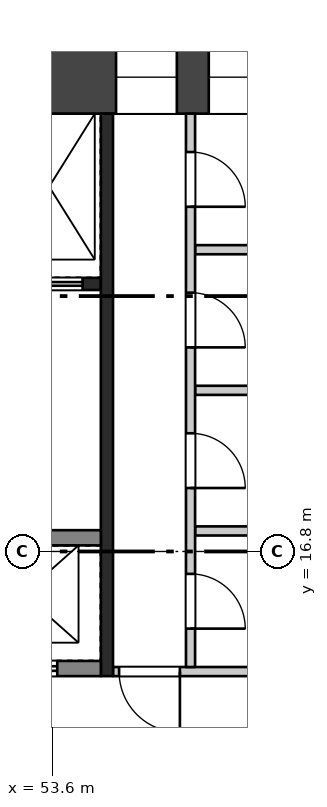
"""IFC4 building model, lengths in metres.
Left out: names, types, materials, properties, quantities, classifications, styles, units other than length and angle.
Written with IfcOpenShell. Run it as: python <this file> out.ifc"""

import sys

from ifc_helpers import new_model, si_unit, direction, frame, frame_2d, origin, place, context, subcontext, project, spatial, rectangle, extrude, element, fill, save


model = new_model("IFC4")
c1 = context("Model", 3, precision=1e-05, world=origin(), true_north=direction((0.0, 1.0)))
c2 = subcontext(c1, "Body", "Model", "MODEL_VIEW")
j1 = project(units=[si_unit("LENGTHUNIT", "METRE"), si_unit("PLANEANGLEUNIT", "RADIAN")], contexts=[c1])
p1 = place(None, origin())
s1 = spatial("IfcSite", under=j1, at=p1, CompositionType="ELEMENT")
p2 = place(p1, origin())
s2 = spatial("IfcBuilding", under=s1, at=p2, CompositionType="ELEMENT")
p3 = place(p2, frame((0.0, 0.0, 158.2)))
s3 = spatial("IfcBuildingStorey", under=s2, at=p3, CompositionType="ELEMENT", Elevation=158.2)
p4 = place(p3, frame((42.0, 24.6, 0.0), z_axis=(0.0, 0.0, 1.0), x_axis=(1.0, 0.0, 0.0)))
e1 = element("IfcWall", 1, at=p4, inside=s3, PredefinedType="SHEAR", context=c2, shape_type="SweptSolid", body=[
    extrude(rectangle(XDim=16.8, YDim=1.2, at=frame_2d((8.4, 0.0))), origin(), (0.0, 0.0, 1.0), 3.22),
])
p5 = place(p4, frame((1.8, 0.0, 0.5)))
e2 = element("IfcOpeningElement", 2, at=p5, cuts=e1, PredefinedType="OPENING", context=c2, shape_type="SweptSolid", body=[
    extrude(rectangle(XDim=1.8, YDim=2.4, at=frame_2d((0.9, 1.2))), frame((0.0, 0.61, 0.0), z_axis=(0.0, -1.0, 0.0), x_axis=(1.0, 0.0, 0.0)), (0.0, 0.0, 1.0), 1.22),
])
p6 = place(p4, frame((4.49, 0.0, 1.6)))
e3 = element("IfcOpeningElement", 3, at=p6, cuts=e1, PredefinedType="OPENING", context=c2, shape_type="SweptSolid", body=[
    extrude(rectangle(XDim=0.9, YDim=1.2, at=frame_2d((0.45, 0.6))), frame((0.0, 0.61, 0.0), z_axis=(0.0, -1.0, 0.0), x_axis=(1.0, 0.0, 0.0)), (0.0, 0.0, 1.0), 1.22),
])
p7 = place(p4, frame((5.71, 0.0, 1.6)))
e4 = element("IfcOpeningElement", 4, at=p7, cuts=e1, PredefinedType="OPENING", context=c2, shape_type="SweptSolid", body=[
    extrude(rectangle(XDim=1.1, YDim=1.2, at=frame_2d((0.55, 0.6))), frame((0.0, 0.61, 0.0), z_axis=(0.0, -1.0, 0.0), x_axis=(1.0, 0.0, 0.0)), (0.0, 0.0, 1.0), 1.22),
])
p8 = place(p4, frame((7.15, 0.0, 1.6)))
e5 = element("IfcOpeningElement", 5, at=p8, cuts=e1, PredefinedType="OPENING", context=c2, shape_type="SweptSolid", body=[
    extrude(rectangle(XDim=1.1, YDim=1.2, at=frame_2d((0.55, 0.6))), frame((0.0, 0.61, 0.0), z_axis=(0.0, -1.0, 0.0), x_axis=(1.0, 0.0, 0.0)), (0.0, 0.0, 1.0), 1.22),
])
p9 = place(p4, frame((12.65, 0.0, 0.6)))
e6 = element("IfcOpeningElement", 6, at=p9, cuts=e1, PredefinedType="OPENING", context=c2, shape_type="SweptSolid", body=[
    extrude(rectangle(XDim=1.0, YDim=2.1, at=frame_2d((0.5, 1.05))), frame((0.0, 0.61, 0.0), z_axis=(0.0, -1.0, 0.0), x_axis=(1.0, 0.0, 0.0)), (0.0, 0.0, 1.0), 1.22),
])
p10 = place(p4, frame((14.175, 0.0, 1.6)))
e7 = element("IfcOpeningElement", 7, at=p10, cuts=e1, PredefinedType="OPENING", context=c2, shape_type="SweptSolid", body=[
    extrude(rectangle(XDim=1.2, YDim=1.2, at=frame_2d((0.6, 0.6))), frame((0.0, 0.61, 0.0), z_axis=(0.0, -1.0, 0.0), x_axis=(1.0, 0.0, 0.0)), (0.0, 0.0, 1.0), 1.22),
])
p11 = place(p3, frame((46.4, 14.875, 0.0), z_axis=(0.0, 0.0, 1.0), x_axis=(1.0, 0.0, 0.0)))
e8 = element("IfcWall", 8, at=p11, inside=s3, PredefinedType="SHEAR", context=c2, shape_type="SweptSolid", body=[
    extrude(rectangle(XDim=8.0, YDim=0.25, at=frame_2d((4.0, 0.0))), origin(), (0.0, 0.0, 1.0), 3.22),
])
p12 = place(p11, frame((0.717, 0.0, 0.0)))
e9 = element("IfcOpeningElement", 9, at=p12, cuts=e8, PredefinedType="OPENING", context=c2, shape_type="SweptSolid", body=[
    extrude(rectangle(XDim=1.1, YDim=2.1, at=frame_2d((0.55, 1.05))), frame((0.0, 0.135, 0.0), z_axis=(0.0, -1.0, 0.0), x_axis=(1.0, 0.0, 0.0)), (0.0, 0.0, 1.0), 0.27),
])
p13 = place(p11, frame((3.45, 0.0, 0.0)))
e10 = element("IfcOpeningElement", 10, at=p13, cuts=e8, PredefinedType="OPENING", context=c2, shape_type="SweptSolid", body=[
    extrude(rectangle(XDim=1.1, YDim=2.1, at=frame_2d((0.55, 1.05))), frame((0.0, 0.135, 0.0), z_axis=(0.0, -1.0, 0.0), x_axis=(1.0, 0.0, 0.0)), (0.0, 0.0, 1.0), 0.27),
])
p14 = place(p11, frame((6.183, 0.0, 0.0)))
e11 = element("IfcOpeningElement", 11, at=p14, cuts=e8, PredefinedType="OPENING", context=c2, shape_type="SweptSolid", body=[
    extrude(rectangle(XDim=1.1, YDim=2.1, at=frame_2d((0.55, 1.05))), frame((0.0, 0.135, 0.0), z_axis=(0.0, -1.0, 0.0), x_axis=(1.0, 0.0, 0.0)), (0.0, 0.0, 1.0), 0.27),
])
p15 = place(p3, frame((46.4, 17.025, 0.0), z_axis=(0.0, 0.0, 1.0), x_axis=(1.0, 0.0, 0.0)))
e12 = element("IfcWall", 12, at=p15, inside=s3, PredefinedType="SHEAR", context=c2, shape_type="SweptSolid", body=[
    extrude(rectangle(XDim=8.0, YDim=0.25, at=frame_2d((4.0, 0.0))), origin(), (0.0, 0.0, 1.0), 3.22),
])
p16 = place(p3, frame((46.4, 21.2, 0.0), z_axis=(0.0, 0.0, 1.0), x_axis=(1.0, 0.0, 0.0)))
e13 = element("IfcWall", 13, at=p16, inside=s3, PredefinedType="SHEAR", context=c2, shape_type="SweptSolid", body=[
    extrude(rectangle(XDim=8.0, YDim=0.2, at=frame_2d((4.0, 0.0))), origin(), (0.0, 0.0, 1.0), 3.22),
])
p17 = place(p16, frame((0.09, 0.0, 0.0)))
e14 = element("IfcOpeningElement", 14, at=p17, cuts=e13, PredefinedType="OPENING", context=c2, shape_type="SweptSolid", body=[
    extrude(rectangle(XDim=0.9, YDim=2.1, at=frame_2d((0.45, 1.05))), frame((0.0, 0.11, 0.0), z_axis=(0.0, -1.0, 0.0), x_axis=(1.0, 0.0, 0.0)), (0.0, 0.0, 1.0), 0.22),
])
p18 = place(p16, frame((1.41, 0.0, 0.0)))
e15 = element("IfcOpeningElement", 15, at=p18, cuts=e13, PredefinedType="OPENING", context=c2, shape_type="SweptSolid", body=[
    extrude(rectangle(XDim=0.9, YDim=2.1, at=frame_2d((0.45, 1.05))), frame((0.0, 0.11, 0.0), z_axis=(0.0, -1.0, 0.0), x_axis=(1.0, 0.0, 0.0)), (0.0, 0.0, 1.0), 0.22),
])
p19 = place(p16, frame((2.82, 0.0, 0.0)))
e16 = element("IfcOpeningElement", 16, at=p19, cuts=e13, PredefinedType="OPENING", context=c2, shape_type="SweptSolid", body=[
    extrude(rectangle(XDim=0.9, YDim=2.1, at=frame_2d((0.45, 1.05))), frame((0.0, 0.11, 0.0), z_axis=(0.0, -1.0, 0.0), x_axis=(1.0, 0.0, 0.0)), (0.0, 0.0, 1.0), 0.22),
])
p20 = place(p16, frame((4.55, 0.0, 0.0)))
e17 = element("IfcOpeningElement", 17, at=p20, cuts=e13, PredefinedType="OPENING", context=c2, shape_type="SweptSolid", body=[
    extrude(rectangle(XDim=1.1, YDim=2.1, at=frame_2d((0.55, 1.05))), frame((0.0, 0.11, 0.0), z_axis=(0.0, -1.0, 0.0), x_axis=(1.0, 0.0, 0.0)), (0.0, 0.0, 1.0), 0.22),
])
p21 = place(p16, frame((6.6, 0.0, 0.0)))
e18 = element("IfcOpeningElement", 18, at=p21, cuts=e13, PredefinedType="OPENING", context=c2, shape_type="SweptSolid", body=[
    extrude(rectangle(XDim=1.1, YDim=2.1, at=frame_2d((0.55, 1.05))), frame((0.0, 0.11, 0.0), z_axis=(0.0, -1.0, 0.0), x_axis=(1.0, 0.0, 0.0)), (0.0, 0.0, 1.0), 0.22),
])
p22 = place(p3, frame((54.5, 14.75, 0.0), z_axis=(0.0, 0.0, 1.0), x_axis=(0.0, 1.0, 0.0)))
e19 = element("IfcWall", 19, at=p22, inside=s3, PredefinedType="SHEAR", context=c2, shape_type="SweptSolid", body=[
    extrude(rectangle(XDim=9.25, YDim=0.2, at=frame_2d((4.625, 0.0))), origin(), (0.0, 0.0, 1.0), 3.22),
])
p23 = place(p3, frame((54.6, 14.825, 0.0), z_axis=(0.0, 0.0, 1.0), x_axis=(1.0, 0.0, 0.0)))
e20 = element("IfcWall", 20, at=p23, inside=s3, PredefinedType="PARTITIONING", context=c2, shape_type="SweptSolid", body=[
    extrude(rectangle(XDim=3.0, YDim=0.15, at=frame_2d((1.5, 0.0))), origin(), (0.0, 0.0, 1.0), 3.22),
])
p24 = place(p23, frame((0.1, 0.0, 0.0)))
e21 = element("IfcOpeningElement", 21, at=p24, cuts=e20, PredefinedType="OPENING", context=c2, shape_type="SweptSolid", body=[
    extrude(rectangle(XDim=1.0, YDim=2.1, at=frame_2d((0.5, 1.05))), frame((0.0, 0.085, 0.0), z_axis=(0.0, -1.0, 0.0), x_axis=(1.0, 0.0, 0.0)), (0.0, 0.0, 1.0), 0.17),
])
for number, where, z_axis, x_axis in (
    (22, (55.95, 17.137, 0.0), (0.0, 0.0, 1.0), (1.0, 0.0, 0.0)),
    (23, (55.95, 19.45, 0.0), (0.0, 0.0, 1.0), (1.0, 0.0, 0.0)),
    (24, (55.95, 21.762, 0.0), (0.0, 0.0, 1.0), (1.0, 0.0, 0.0)),
):
    element("IfcWall", number, at=place(p3, frame(where, z_axis=z_axis, x_axis=x_axis)), inside=s3, PredefinedType="PARTITIONING", context=c2, shape_type="SweptSolid", body=[
        extrude(rectangle(XDim=1.65, YDim=0.15, at=frame_2d((0.825, 0.0))), origin(), (0.0, 0.0, 1.0), 3.22),
    ])
p25 = place(p3, frame((55.875, 14.9, 0.0), z_axis=(0.0, 0.0, 1.0), x_axis=(0.0, 1.0, 0.0)))
e25 = element("IfcWall", 25, at=p25, inside=s3, PredefinedType="PARTITIONING", context=c2, shape_type="SweptSolid", body=[
    extrude(rectangle(XDim=9.1, YDim=0.15, at=frame_2d((4.55, 0.0))), origin(), (0.0, 0.0, 1.0), 3.22),
])
p26 = place(p25, frame((0.631, 0.0, 0.0)))
e26 = element("IfcOpeningElement", 26, at=p26, cuts=e25, PredefinedType="OPENING", context=c2, shape_type="SweptSolid", body=[
    extrude(rectangle(XDim=0.9, YDim=2.1, at=frame_2d((0.45, 1.05))), frame((0.0, 0.085, 0.0), z_axis=(0.0, -1.0, 0.0), x_axis=(1.0, 0.0, 0.0)), (0.0, 0.0, 1.0), 0.17),
])
p27 = place(p25, frame((2.944, 0.0, 0.0)))
e27 = element("IfcOpeningElement", 27, at=p27, cuts=e25, PredefinedType="OPENING", context=c2, shape_type="SweptSolid", body=[
    extrude(rectangle(XDim=0.9, YDim=2.1, at=frame_2d((0.45, 1.05))), frame((0.0, 0.085, 0.0), z_axis=(0.0, -1.0, 0.0), x_axis=(1.0, 0.0, 0.0)), (0.0, 0.0, 1.0), 0.17),
])
p28 = place(p25, frame((5.256, 0.0, 0.0)))
e28 = element("IfcOpeningElement", 28, at=p28, cuts=e25, PredefinedType="OPENING", context=c2, shape_type="SweptSolid", body=[
    extrude(rectangle(XDim=0.9, YDim=2.1, at=frame_2d((0.45, 1.05))), frame((0.0, 0.085, 0.0), z_axis=(0.0, -1.0, 0.0), x_axis=(1.0, 0.0, 0.0)), (0.0, 0.0, 1.0), 0.17),
])
p29 = place(p25, frame((7.569, 0.0, 0.0)))
e29 = element("IfcOpeningElement", 29, at=p29, cuts=e25, PredefinedType="OPENING", context=c2, shape_type="SweptSolid", body=[
    extrude(rectangle(XDim=0.9, YDim=2.1, at=frame_2d((0.45, 1.05))), frame((0.0, 0.085, 0.0), z_axis=(0.0, -1.0, 0.0), x_axis=(1.0, 0.0, 0.0)), (0.0, 0.0, 1.0), 0.17),
])
p30 = place(p14, origin())
e30 = element("IfcDoor", 30, at=p30, inside=s3, OperationType="DOUBLE_DOOR_SLIDING", PredefinedType="DOOR", context=c2, shape_type="SweptSolid", body=[
    extrude(rectangle(XDim=1.1, YDim=2.1, at=frame_2d((0.55, 1.05))), frame((0.0, 0.025, 0.0), z_axis=(0.0, -1.0, 0.0), x_axis=(1.0, 0.0, 0.0)), (0.0, 0.0, 1.0), 0.05),
])
fill(e11, e30)
p31 = place(p21, origin())
e31 = element("IfcDoor", 31, at=p31, inside=s3, OperationType="DOUBLE_DOOR_SLIDING", PredefinedType="DOOR", context=c2, shape_type="SweptSolid", body=[
    extrude(rectangle(XDim=1.1, YDim=2.1, at=frame_2d((0.55, 1.05))), frame((0.0, 0.025, 0.0), z_axis=(0.0, -1.0, 0.0), x_axis=(1.0, 0.0, 0.0)), (0.0, 0.0, 1.0), 0.05),
])
fill(e18, e31)
p32 = place(p24, frame((1.0, 0.0, 0.0), z_axis=(0.0, 0.0, 1.0), x_axis=(-1.0, 0.0, 0.0)))
e32 = element("IfcDoor", 32, at=p32, inside=s3, OperationType="SINGLE_SWING_LEFT", PredefinedType="DOOR", context=c2, shape_type="SweptSolid", body=[
    extrude(rectangle(XDim=1.0, YDim=2.1, at=frame_2d((0.5, 1.05))), frame((0.0, 0.025, 0.0), z_axis=(0.0, -1.0, 0.0), x_axis=(1.0, 0.0, 0.0)), (0.0, 0.0, 1.0), 0.05),
])
fill(e21, e32)
p33 = place(p26, frame((0.9, 0.0, 0.0), z_axis=(0.0, 0.0, 1.0), x_axis=(-1.0, 0.0, 0.0)))
e33 = element("IfcDoor", 33, at=p33, inside=s3, OperationType="SINGLE_SWING_RIGHT", PredefinedType="DOOR", context=c2, shape_type="SweptSolid", body=[
    extrude(rectangle(XDim=0.9, YDim=2.1, at=frame_2d((0.45, 1.05))), frame((0.0, 0.025, 0.0), z_axis=(0.0, -1.0, 0.0), x_axis=(1.0, 0.0, 0.0)), (0.0, 0.0, 1.0), 0.05),
])
fill(e26, e33)
p34 = place(p27, frame((0.9, 0.0, 0.0), z_axis=(0.0, 0.0, 1.0), x_axis=(-1.0, 0.0, 0.0)))
e34 = element("IfcDoor", 34, at=p34, inside=s3, OperationType="SINGLE_SWING_RIGHT", PredefinedType="DOOR", context=c2, shape_type="SweptSolid", body=[
    extrude(rectangle(XDim=0.9, YDim=2.1, at=frame_2d((0.45, 1.05))), frame((0.0, 0.025, 0.0), z_axis=(0.0, -1.0, 0.0), x_axis=(1.0, 0.0, 0.0)), (0.0, 0.0, 1.0), 0.05),
])
fill(e27, e34)
p35 = place(p28, frame((0.9, 0.0, 0.0), z_axis=(0.0, 0.0, 1.0), x_axis=(-1.0, 0.0, 0.0)))
e35 = element("IfcDoor", 35, at=p35, inside=s3, OperationType="SINGLE_SWING_RIGHT", PredefinedType="DOOR", context=c2, shape_type="SweptSolid", body=[
    extrude(rectangle(XDim=0.9, YDim=2.1, at=frame_2d((0.45, 1.05))), frame((0.0, 0.025, 0.0), z_axis=(0.0, -1.0, 0.0), x_axis=(1.0, 0.0, 0.0)), (0.0, 0.0, 1.0), 0.05),
])
fill(e28, e35)
p36 = place(p29, frame((0.9, 0.0, 0.0), z_axis=(0.0, 0.0, 1.0), x_axis=(-1.0, 0.0, 0.0)))
e36 = element("IfcDoor", 36, at=p36, inside=s3, OperationType="SINGLE_SWING_RIGHT", PredefinedType="DOOR", context=c2, shape_type="SweptSolid", body=[
    extrude(rectangle(XDim=0.9, YDim=2.1, at=frame_2d((0.45, 1.05))), frame((0.0, 0.025, 0.0), z_axis=(0.0, -1.0, 0.0), x_axis=(1.0, 0.0, 0.0)), (0.0, 0.0, 1.0), 0.05),
])
fill(e29, e36)
p37 = place(p9, origin())
e37 = element("IfcWindow", 37, at=p37, inside=s3, PartitioningType="SINGLE_PANEL", PredefinedType="WINDOW", context=c2, shape_type="SweptSolid", body=[
    extrude(rectangle(XDim=1.0, YDim=2.1, at=frame_2d((0.5, 1.05))), frame((0.0, 0.03, 0.0), z_axis=(0.0, -1.0, 0.0), x_axis=(1.0, 0.0, 0.0)), (0.0, 0.0, 1.0), 0.06),
])
fill(e6, e37)
p38 = place(p10, origin())
e38 = element("IfcWindow", 38, at=p38, inside=s3, PartitioningType="SINGLE_PANEL", PredefinedType="WINDOW", context=c2, shape_type="SweptSolid", body=[
    extrude(rectangle(XDim=1.2, YDim=1.2, at=frame_2d((0.6, 0.6))), frame((0.0, 0.03, 0.0), z_axis=(0.0, -1.0, 0.0), x_axis=(1.0, 0.0, 0.0)), (0.0, 0.0, 1.0), 0.06),
])
fill(e7, e38)
save(model, sys.argv[1])
